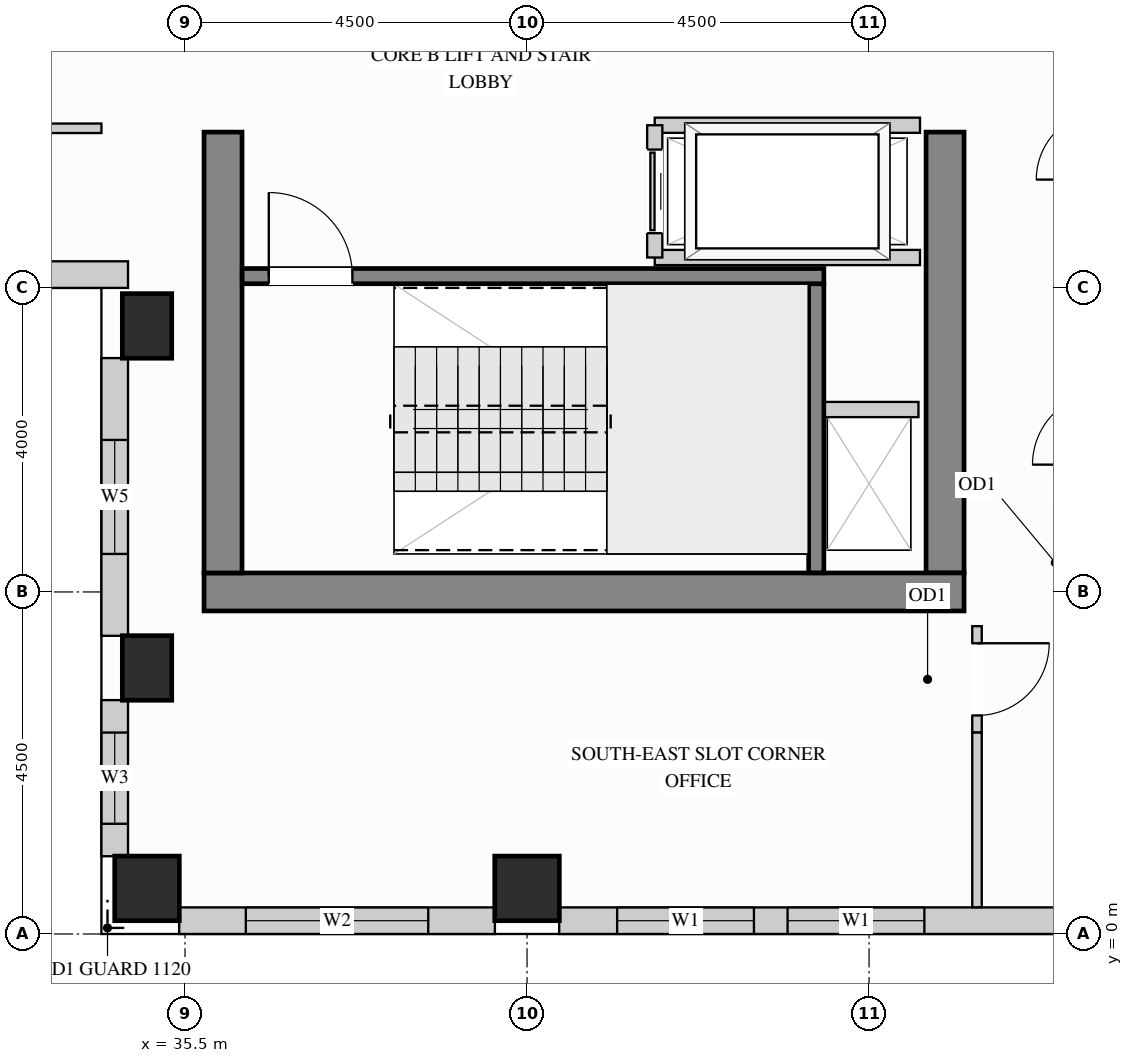
"""IFC4 building model, lengths in metres.
Left out: names, types, materials, properties, quantities, classifications, styles, units other than length and angle.
Written with IfcOpenShell. Run it as: python <this file> out.ifc"""

import sys

from ifc_helpers import new_model, si_unit, direction, frame, frame_2d, origin, origin_2d, place, context, subcontext, project, spatial, rectangle, extrude, source, transform, mapped, element, fill, save


model = new_model("IFC4")
c1 = context("Model", 3, precision=1e-05, world=origin(), true_north=direction((0.0, 1.0)))
c2 = subcontext(c1, "Body", "Model", "MODEL_VIEW")
j1 = project(units=[si_unit("LENGTHUNIT", "METRE"), si_unit("PLANEANGLEUNIT", "RADIAN")], contexts=[c1])
p1 = place(None, origin())
s1 = spatial("IfcSite", under=j1, at=p1, CompositionType="ELEMENT")
p2 = place(p1, origin())
s2 = spatial("IfcBuilding", under=s1, at=p2, CompositionType="ELEMENT")
p3 = place(p2, frame((0.0, 0.0, 237.6)))
s3 = spatial("IfcBuildingStorey", under=s2, at=p3, CompositionType="ELEMENT", Elevation=237.6)
m1 = source(origin(), c2, "Body", "SweptSolid", [
    extrude(rectangle(XDim=0.65, YDim=0.85, at=origin_2d()), origin(), (0.0, 0.0, 1.0), 3.4),
])
for number, where, z_axis, x_axis in (
    (1, (35.0, 3.5, 0.0), (0.0, 0.0, 1.0), (1.0, 0.0, 0.0)),
    (2, (35.0, 8.0, 0.0), (0.0, 0.0, 1.0), (1.0, 0.0, 0.0)),
):
    element("IfcColumn", number, at=place(p3, frame(where, z_axis=z_axis, x_axis=x_axis)), inside=s3, PredefinedType="COLUMN", context=c2, shape_type="MappedRepresentation", body=[
        mapped(m1, transform((0.0, 0.0, 0.0), x_axis=(1.0, 0.0, 0.0), y_axis=(0.0, 1.0, 0.0), z_axis=(0.0, 0.0, 1.0))),
    ])
m2 = source(origin(), c2, "Body", "SweptSolid", [
    extrude(rectangle(XDim=0.85, YDim=0.85, at=origin_2d()), origin(), (0.0, 0.0, 1.0), 3.4),
])
for number, where, z_axis, x_axis in (
    (3, (35.0, 0.6, 0.0), (0.0, 0.0, 1.0), (1.0, 0.0, 0.0)),
    (4, (40.0, 0.6, 0.0), (0.0, 0.0, 1.0), (1.0, 0.0, 0.0)),
):
    element("IfcColumn", number, at=place(p3, frame(where, z_axis=z_axis, x_axis=x_axis)), inside=s3, PredefinedType="COLUMN", context=c2, shape_type="MappedRepresentation", body=[
        mapped(m2, transform((0.0, 0.0, 0.0), x_axis=(1.0, 0.0, 0.0), y_axis=(0.0, 1.0, 0.0), z_axis=(0.0, 0.0, 1.0))),
    ])
m3 = source(origin(), c2, "Body", "SweptSolid", [
    extrude(rectangle(XDim=5.8, YDim=0.5, at=frame_2d((2.9, 0.0))), origin(), (0.0, 0.0, 1.0), 3.4),
])
p4 = place(p3, frame((45.5, 4.75, 0.0), z_axis=(0.0, 0.0, 1.0), x_axis=(0.0, 1.0, 0.0)))
e5 = element("IfcWall", 5, at=p4, inside=s3, PredefinedType="SHEAR", context=c2, shape_type="MappedRepresentation", body=[
    mapped(m3, transform((0.0, 0.0, 0.0), x_axis=(1.0, 0.0, 0.0), y_axis=(0.0, 1.0, 0.0), z_axis=(0.0, 0.0, 1.0))),
])
m4 = source(origin(), c2, "Body", "SweptSolid", [
    extrude(rectangle(XDim=10.0, YDim=0.5, at=frame_2d((5.0, 0.0))), origin(), (0.0, 0.0, 1.0), 3.4),
])
p5 = place(p3, frame((35.75, 4.5, 0.0), z_axis=(0.0, 0.0, 1.0), x_axis=(1.0, 0.0, 0.0)))
e6 = element("IfcWall", 6, at=p5, inside=s3, PredefinedType="SHEAR", context=c2, shape_type="MappedRepresentation", body=[
    mapped(m4, transform((0.0, 0.0, 0.0), x_axis=(1.0, 0.0, 0.0), y_axis=(0.0, 1.0, 0.0), z_axis=(0.0, 0.0, 1.0))),
])
p6 = place(p3, frame((36.0, 4.75, 0.0), z_axis=(0.0, 0.0, 1.0), x_axis=(0.0, 1.0, 0.0)))
e7 = element("IfcWall", 7, at=p6, inside=s3, PredefinedType="SHEAR", context=c2, shape_type="MappedRepresentation", body=[
    mapped(m3, transform((0.0, 0.0, 0.0), x_axis=(1.0, 0.0, 0.0), y_axis=(0.0, 1.0, 0.0), z_axis=(0.0, 0.0, 1.0))),
])
p7 = place(p3, frame((19.323, 8.675, 0.0), z_axis=(0.0, 0.0, 1.0), x_axis=(1.0, 0.0, 0.0)))
e8 = element("IfcWall", 8, at=p7, inside=s3, PredefinedType="SOLIDWALL", context=c2, shape_type="SweptSolid", body=[
    extrude(rectangle(XDim=15.427, YDim=0.35, at=frame_2d((7.713, 0.0))), origin(), (0.0, 0.0, 1.0), 3.385),
])
p8 = place(p7, frame((1.672, 0.0, 0.78)))
e9 = element("IfcOpeningElement", 9, at=p8, cuts=e8, PredefinedType="OPENING", context=c2, shape_type="SweptSolid", body=[
    extrude(rectangle(XDim=1.5, YDim=2.0, at=frame_2d((0.75, 1.0))), frame((0.0, 0.185, 0.0), z_axis=(0.0, -1.0, 0.0), x_axis=(1.0, 0.0, 0.0)), (0.0, 0.0, 1.0), 0.37),
])
p9 = place(p7, frame((4.525, 0.0, 0.78)))
e10 = element("IfcOpeningElement", 10, at=p9, cuts=e8, PredefinedType="OPENING", context=c2, shape_type="SweptSolid", body=[
    extrude(rectangle(XDim=1.5, YDim=2.0, at=frame_2d((0.75, 1.0))), frame((0.0, 0.185, 0.0), z_axis=(0.0, -1.0, 0.0), x_axis=(1.0, 0.0, 0.0)), (0.0, 0.0, 1.0), 0.37),
])
p10 = place(p7, frame((9.287, 0.0, 0.78)))
e11 = element("IfcOpeningElement", 11, at=p10, cuts=e8, PredefinedType="OPENING", context=c2, shape_type="SweptSolid", body=[
    extrude(rectangle(XDim=1.5, YDim=2.0, at=frame_2d((0.75, 1.0))), frame((0.0, 0.185, 0.0), z_axis=(0.0, -1.0, 0.0), x_axis=(1.0, 0.0, 0.0)), (0.0, 0.0, 1.0), 0.37),
])
p11 = place(p7, frame((12.197, 0.0, 0.78)))
e12 = element("IfcOpeningElement", 12, at=p11, cuts=e8, PredefinedType="OPENING", context=c2, shape_type="SweptSolid", body=[
    extrude(rectangle(XDim=1.5, YDim=2.0, at=frame_2d((0.75, 1.0))), frame((0.0, 0.185, 0.0), z_axis=(0.0, -1.0, 0.0), x_axis=(1.0, 0.0, 0.0)), (0.0, 0.0, 1.0), 0.37),
])
p12 = place(p3, frame((34.575, 7.577, 0.0), z_axis=(0.0, 0.0, 1.0), x_axis=(0.0, -1.0, 0.0)))
e13 = element("IfcWall", 13, at=p12, inside=s3, PredefinedType="SOLIDWALL", context=c2, shape_type="SweptSolid", body=[
    extrude(rectangle(XDim=3.654, YDim=0.35, at=frame_2d((1.827, 0.0))), origin(), (0.0, 0.0, 1.0), 3.385),
])
p13 = place(p12, frame((1.077, 0.0, 0.78)))
e14 = element("IfcOpeningElement", 14, at=p13, cuts=e13, PredefinedType="OPENING", context=c2, shape_type="SweptSolid", body=[
    extrude(rectangle(XDim=1.5, YDim=2.0, at=frame_2d((0.75, 1.0))), frame((0.0, 0.185, 0.0), z_axis=(0.0, -1.0, 0.0), x_axis=(1.0, 0.0, 0.0)), (0.0, 0.0, 1.0), 0.37),
])
p14 = place(p3, frame((34.575, 3.077, 0.0), z_axis=(0.0, 0.0, 1.0), x_axis=(0.0, -1.0, 0.0)))
e15 = element("IfcWall", 15, at=p14, inside=s3, PredefinedType="SOLIDWALL", context=c2, shape_type="SweptSolid", body=[
    extrude(rectangle(XDim=2.054, YDim=0.35, at=frame_2d((1.027, 0.0))), origin(), (0.0, 0.0, 1.0), 3.385),
])
p15 = place(p14, frame((0.427, 0.0, 0.78)))
e16 = element("IfcOpeningElement", 16, at=p15, cuts=e15, PredefinedType="OPENING", context=c2, shape_type="SweptSolid", body=[
    extrude(rectangle(XDim=1.2, YDim=2.0, at=frame_2d((0.6, 1.0))), frame((0.0, 0.185, 0.0), z_axis=(0.0, -1.0, 0.0), x_axis=(1.0, 0.0, 0.0)), (0.0, 0.0, 1.0), 0.37),
])
p16 = place(p3, frame((35.423, 0.175, 0.0), z_axis=(0.0, 0.0, 1.0), x_axis=(1.0, 0.0, 0.0)))
e17 = element("IfcWall", 17, at=p16, inside=s3, PredefinedType="SOLIDWALL", context=c2, shape_type="SweptSolid", body=[
    extrude(rectangle(XDim=4.154, YDim=0.35, at=frame_2d((2.077, 0.0))), origin(), (0.0, 0.0, 1.0), 3.385),
])
p17 = place(p16, frame((0.877, 0.0, 0.78)))
e18 = element("IfcOpeningElement", 18, at=p17, cuts=e17, PredefinedType="OPENING", context=c2, shape_type="SweptSolid", body=[
    extrude(rectangle(XDim=2.4, YDim=2.1, at=frame_2d((1.2, 1.05))), frame((0.0, 0.185, 0.0), z_axis=(0.0, -1.0, 0.0), x_axis=(1.0, 0.0, 0.0)), (0.0, 0.0, 1.0), 0.37),
])
p18 = place(p3, frame((40.423, 0.175, 0.0), z_axis=(0.0, 0.0, 1.0), x_axis=(1.0, 0.0, 0.0)))
e19 = element("IfcWall", 19, at=p18, inside=s3, PredefinedType="SOLIDWALL", context=c2, shape_type="SweptSolid", body=[
    extrude(rectangle(XDim=7.077, YDim=0.35, at=frame_2d((3.539, 0.0))), origin(), (0.0, 0.0, 1.0), 3.385),
])
p19 = place(p18, frame((0.762, 0.0, 0.78)))
e20 = element("IfcOpeningElement", 20, at=p19, cuts=e19, PredefinedType="OPENING", context=c2, shape_type="SweptSolid", body=[
    extrude(rectangle(XDim=1.8, YDim=2.1, at=frame_2d((0.9, 1.05))), frame((0.0, 0.185, 0.0), z_axis=(0.0, -1.0, 0.0), x_axis=(1.0, 0.0, 0.0)), (0.0, 0.0, 1.0), 0.37),
])
p20 = place(p18, frame((3.005, 0.0, 0.78)))
e21 = element("IfcOpeningElement", 21, at=p20, cuts=e19, PredefinedType="OPENING", context=c2, shape_type="SweptSolid", body=[
    extrude(rectangle(XDim=1.8, YDim=2.1, at=frame_2d((0.9, 1.05))), frame((0.0, 0.185, 0.0), z_axis=(0.0, -1.0, 0.0), x_axis=(1.0, 0.0, 0.0)), (0.0, 0.0, 1.0), 0.37),
])
p21 = place(p3, frame((45.92, 2.65, 0.0), z_axis=(0.0, 0.0, 1.0), x_axis=(0.0, 1.0, 0.0)))
e22 = element("IfcWall", 22, at=p21, inside=s3, PredefinedType="PARTITIONING", context=c2, shape_type="SweptSolid", body=[
    extrude(rectangle(XDim=1.4, YDim=0.125, at=frame_2d((0.7, 0.0))), origin(), (0.0, 0.0, 1.0), 3.385),
])
p22 = place(p21, frame((0.225, 0.0, 0.0)))
e23 = element("IfcOpeningElement", 23, at=p22, cuts=e22, PredefinedType="OPENING", context=c2, shape_type="SweptSolid", body=[
    extrude(rectangle(XDim=0.95, YDim=2.15, at=frame_2d((0.475, 1.075))), frame((0.0, 0.073, 0.0), z_axis=(0.0, -1.0, 0.0), x_axis=(1.0, 0.0, 0.0)), (0.0, 0.0, 1.0), 0.145),
])
m5 = source(origin(), c2, "Body", "SweptSolid", [
    extrude(rectangle(XDim=2.298, YDim=0.125, at=frame_2d((1.149, 0.0))), origin(), (0.0, 0.0, 1.0), 3.385),
])
p23 = place(p3, frame((45.92, 0.352, 0.0), z_axis=(0.0, 0.0, 1.0), x_axis=(0.0, 1.0, 0.0)))
e24 = element("IfcWall", 24, at=p23, inside=s3, PredefinedType="PARTITIONING", context=c2, shape_type="MappedRepresentation", body=[
    mapped(m5, transform((0.0, 0.0, 0.0), x_axis=(1.0, 0.0, 0.0), y_axis=(0.0, 1.0, 0.0), z_axis=(0.0, 0.0, 1.0))),
])
p24 = place(p3, frame((26.95, 10.6, 0.0), z_axis=(0.0, 0.0, 1.0), x_axis=(1.0, 0.0, 0.0)))
e25 = element("IfcWall", 25, at=p24, inside=s3, PredefinedType="PARTITIONING", context=c2, shape_type="SweptSolid", body=[
    extrude(rectangle(XDim=7.45, YDim=0.125, at=frame_2d((3.725, 0.0))), origin(), (0.0, 0.0, 1.0), 3.385),
])
p25 = place(p24, frame((4.478, 0.0, 0.0)))
e26 = element("IfcOpeningElement", 26, at=p25, cuts=e25, PredefinedType="OPENING", context=c2, shape_type="SweptSolid", body=[
    extrude(rectangle(XDim=0.95, YDim=2.15, at=frame_2d((0.475, 1.075))), frame((0.0, 0.073, 0.0), z_axis=(0.0, -1.0, 0.0), x_axis=(1.0, 0.0, 0.0)), (0.0, 0.0, 1.0), 0.145),
])
m6 = source(origin(), c2, "Body", "SweptSolid", [
    extrude(rectangle(XDim=1.3, YDim=0.2, at=frame_2d((0.65, 0.0))), origin(), (0.0, 0.0, 1.0), 3.385),
])
p26 = place(p3, frame((43.85, 6.9, 0.0), z_axis=(0.0, 0.0, 1.0), x_axis=(1.0, 0.0, 0.0)))
e27 = element("IfcWall", 27, at=p26, inside=s3, PredefinedType="PARTITIONING", context=c2, shape_type="MappedRepresentation", body=[
    mapped(m6, transform((0.0, 0.0, 0.0), x_axis=(1.0, 0.0, 0.0), y_axis=(0.0, 1.0, 0.0), z_axis=(0.0, 0.0, 1.0))),
])
m7 = source(origin(), c2, "Body", "SweptSolid", [
    extrude(rectangle(XDim=3.49, YDim=0.2, at=frame_2d((1.745, 0.0))), origin(), (0.0, 0.0, 1.0), 3.385),
])
for number, where, z_axis, x_axis in (
    (28, (41.68, 10.64, 0.0), (0.0, 0.0, 1.0), (1.0, 0.0, 0.0)),
    (29, (41.68, 8.9, 0.0), (0.0, 0.0, 1.0), (1.0, 0.0, 0.0)),
):
    element("IfcWall", number, at=place(p3, frame(where, z_axis=z_axis, x_axis=x_axis)), inside=s3, PredefinedType="PARTITIONING", context=c2, shape_type="MappedRepresentation", body=[
        mapped(m7, transform((0.0, 0.0, 0.0), x_axis=(1.0, 0.0, 0.0), y_axis=(0.0, 1.0, 0.0), z_axis=(0.0, 0.0, 1.0))),
    ])
p27 = place(p3, frame((41.68, 8.9, 0.0), z_axis=(0.0, 0.0, 1.0), x_axis=(0.0, 1.0, 0.0)))
e30 = element("IfcWall", 30, at=p27, inside=s3, PredefinedType="PARTITIONING", context=c2, shape_type="SweptSolid", body=[
    extrude(rectangle(XDim=1.74, YDim=0.2, at=frame_2d((0.87, 0.0))), origin(), (0.0, 0.0, 1.0), 3.385),
])
p28 = place(p27, frame((0.32, 0.0, 0.0)))
e31 = element("IfcOpeningElement", 31, at=p28, cuts=e30, PredefinedType="OPENING", context=c2, shape_type="SweptSolid", body=[
    extrude(rectangle(XDim=1.1, YDim=2.2, at=frame_2d((0.55, 1.1))), frame((0.0, 0.11, 0.0), z_axis=(0.0, -1.0, 0.0), x_axis=(1.0, 0.0, 0.0)), (0.0, 0.0, 1.0), 0.22),
])
m8 = source(origin(), c2, "Body", "SweptSolid", [
    extrude(rectangle(XDim=3.803, YDim=0.2, at=frame_2d((1.901, 0.0))), origin(), (0.0, 0.0, 1.0), 3.4),
])
p29 = place(p3, frame((43.805, 4.752, 0.0), z_axis=(0.0, 0.0, 1.0), x_axis=(0.0, 1.0, 0.0)))
e32 = element("IfcWall", 32, at=p29, inside=s3, PredefinedType="SHEAR", context=c2, shape_type="MappedRepresentation", body=[
    mapped(m8, transform((0.0, 0.0, 0.0), x_axis=(1.0, 0.0, 0.0), y_axis=(0.0, 1.0, 0.0), z_axis=(0.0, 0.0, 1.0))),
])
p30 = place(p3, frame((36.252, 8.655, 0.0), z_axis=(0.0, 0.0, 1.0), x_axis=(1.0, 0.0, 0.0)))
e33 = element("IfcWall", 33, at=p30, inside=s3, PredefinedType="SHEAR", context=c2, shape_type="SweptSolid", body=[
    extrude(rectangle(XDim=7.653, YDim=0.2, at=frame_2d((3.827, 0.0))), origin(), (0.0, 0.0, 1.0), 3.4),
])
p31 = place(p30, frame((0.35, 0.0, 0.0)))
e34 = element("IfcOpeningElement", 34, at=p31, cuts=e33, PredefinedType="OPENING", context=c2, shape_type="SweptSolid", body=[
    extrude(rectangle(XDim=1.1, YDim=2.15, at=frame_2d((0.55, 1.075))), frame((0.0, 0.11, 0.0), z_axis=(0.0, -1.0, 0.0), x_axis=(1.0, 0.0, 0.0)), (0.0, 0.0, 1.0), 0.22),
])
m9 = source(origin(), c2, "Body", "SweptSolid", [
    extrude(rectangle(XDim=1.1, YDim=2.2, at=frame_2d((0.55, 1.1))), frame((0.0, 0.025, 0.0), z_axis=(0.0, -1.0, 0.0), x_axis=(1.0, 0.0, 0.0)), (0.0, 0.0, 1.0), 0.05),
])
p32 = place(p28, origin())
e35 = element("IfcDoor", 35, at=p32, inside=s3, OperationType="SLIDING_TO_LEFT", PredefinedType="DOOR", context=c2, shape_type="MappedRepresentation", body=[
    mapped(m9, transform((0.0, 0.0, 0.0), x_axis=(1.0, 0.0, 0.0), y_axis=(0.0, 1.0, 0.0), z_axis=(0.0, 0.0, 1.0))),
])
fill(e31, e35)
m10 = source(origin(), c2, "Body", "SweptSolid", [
    extrude(rectangle(XDim=0.95, YDim=2.15, at=frame_2d((0.475, 1.075))), frame((0.0, 0.025, 0.0), z_axis=(0.0, -1.0, 0.0), x_axis=(1.0, 0.0, 0.0)), (0.0, 0.0, 1.0), 0.05),
])
p33 = place(p22, origin())
e36 = element("IfcDoor", 36, at=p33, inside=s3, OperationType="SINGLE_SWING_RIGHT", PredefinedType="DOOR", context=c2, shape_type="MappedRepresentation", body=[
    mapped(m10, transform((0.0, 0.0, 0.0), x_axis=(1.0, 0.0, 0.0), y_axis=(0.0, 1.0, 0.0), z_axis=(0.0, 0.0, 1.0))),
])
fill(e23, e36)
m11 = source(origin(), c2, "Body", "SweptSolid", [
    extrude(rectangle(XDim=1.1, YDim=2.15, at=frame_2d((0.55, 1.075))), frame((0.0, 0.025, 0.0), z_axis=(0.0, -1.0, 0.0), x_axis=(1.0, 0.0, 0.0)), (0.0, 0.0, 1.0), 0.05),
])
p34 = place(p31, origin())
e37 = element("IfcDoor", 37, at=p34, inside=s3, OperationType="SINGLE_SWING_LEFT", PredefinedType="DOOR", context=c2, shape_type="MappedRepresentation", body=[
    mapped(m11, transform((0.0, 0.0, 0.0), x_axis=(1.0, 0.0, 0.0), y_axis=(0.0, 1.0, 0.0), z_axis=(0.0, 0.0, 1.0))),
])
fill(e34, e37)
m12 = source(origin(), c2, "Body", "SweptSolid", [
    extrude(rectangle(XDim=1.8, YDim=2.1, at=frame_2d((0.9, 1.05))), frame((0.0, 0.03, 0.0), z_axis=(0.0, -1.0, 0.0), x_axis=(1.0, 0.0, 0.0)), (0.0, 0.0, 1.0), 0.06),
])
p35 = place(p19, origin())
e38 = element("IfcWindow", 38, at=p35, inside=s3, PartitioningType="SINGLE_PANEL", PredefinedType="WINDOW", context=c2, shape_type="MappedRepresentation", body=[
    mapped(m12, transform((0.0, 0.0, 0.0), x_axis=(1.0, 0.0, 0.0), y_axis=(0.0, 1.0, 0.0), z_axis=(0.0, 0.0, 1.0))),
])
fill(e20, e38)
p36 = place(p20, origin())
e39 = element("IfcWindow", 39, at=p36, inside=s3, PartitioningType="SINGLE_PANEL", PredefinedType="WINDOW", context=c2, shape_type="MappedRepresentation", body=[
    mapped(m12, transform((0.0, 0.0, 0.0), x_axis=(1.0, 0.0, 0.0), y_axis=(0.0, 1.0, 0.0), z_axis=(0.0, 0.0, 1.0))),
])
fill(e21, e39)
m13 = source(origin(), c2, "Body", "SweptSolid", [
    extrude(rectangle(XDim=2.4, YDim=2.1, at=frame_2d((1.2, 1.05))), frame((0.0, 0.03, 0.0), z_axis=(0.0, -1.0, 0.0), x_axis=(1.0, 0.0, 0.0)), (0.0, 0.0, 1.0), 0.06),
])
p37 = place(p17, origin())
e40 = element("IfcWindow", 40, at=p37, inside=s3, PartitioningType="SINGLE_PANEL", PredefinedType="WINDOW", context=c2, shape_type="MappedRepresentation", body=[
    mapped(m13, transform((0.0, 0.0, 0.0), x_axis=(1.0, 0.0, 0.0), y_axis=(0.0, 1.0, 0.0), z_axis=(0.0, 0.0, 1.0))),
])
fill(e18, e40)
m14 = source(origin(), c2, "Body", "SweptSolid", [
    extrude(rectangle(XDim=1.2, YDim=2.0, at=frame_2d((0.6, 1.0))), frame((0.0, 0.03, 0.0), z_axis=(0.0, -1.0, 0.0), x_axis=(1.0, 0.0, 0.0)), (0.0, 0.0, 1.0), 0.06),
])
p38 = place(p15, origin())
e41 = element("IfcWindow", 41, at=p38, inside=s3, PartitioningType="SINGLE_PANEL", PredefinedType="WINDOW", context=c2, shape_type="MappedRepresentation", body=[
    mapped(m14, transform((0.0, 0.0, 0.0), x_axis=(1.0, 0.0, 0.0), y_axis=(0.0, 1.0, 0.0), z_axis=(0.0, 0.0, 1.0))),
])
fill(e16, e41)
m15 = source(origin(), c2, "Body", "SweptSolid", [
    extrude(rectangle(XDim=1.5, YDim=2.0, at=frame_2d((0.75, 1.0))), frame((0.0, 0.03, 0.0), z_axis=(0.0, -1.0, 0.0), x_axis=(1.0, 0.0, 0.0)), (0.0, 0.0, 1.0), 0.06),
])
p39 = place(p13, origin())
e42 = element("IfcWindow", 42, at=p39, inside=s3, PartitioningType="SINGLE_PANEL", PredefinedType="WINDOW", context=c2, shape_type="MappedRepresentation", body=[
    mapped(m15, transform((0.0, 0.0, 0.0), x_axis=(1.0, 0.0, 0.0), y_axis=(0.0, 1.0, 0.0), z_axis=(0.0, 0.0, 1.0))),
])
fill(e14, e42)
save(model, sys.argv[1])
